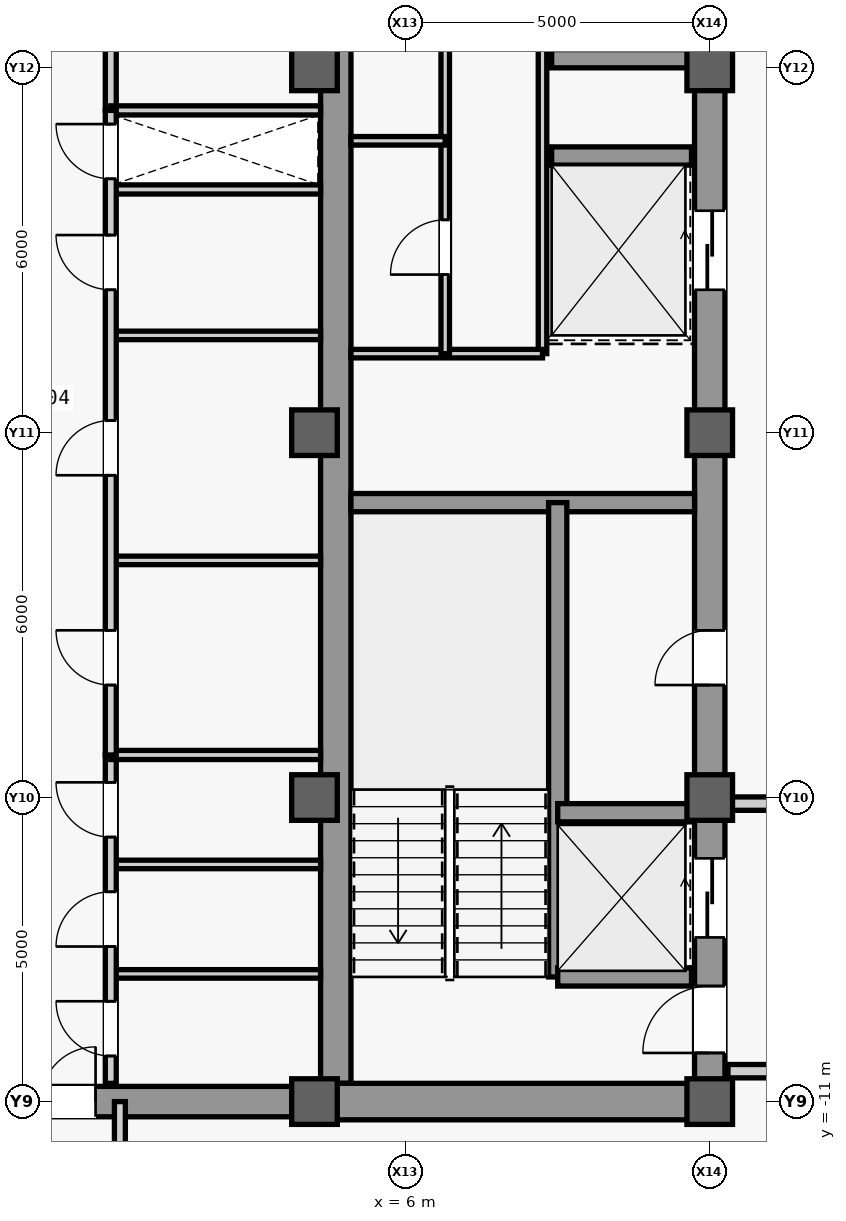
"""IFC4 building model, lengths in metres.
Left out: names, types, materials, properties, quantities, classifications, styles, units other than length and angle.
Written with IfcOpenShell. Run it as: python <this file> out.ifc"""

import sys

from ifc_helpers import new_model, si_unit, direction, frame, frame_2d, origin, origin_2d, place, context, subcontext, project, spatial, rectangle, extrude, source, transform, mapped, element, fill, save


model = new_model("IFC4")
c1 = context("Model", 3, precision=1e-05, world=origin(), true_north=direction((0.0, 1.0)))
c2 = subcontext(c1, "Body", "Model", "MODEL_VIEW")
j1 = project(units=[si_unit("LENGTHUNIT", "METRE"), si_unit("PLANEANGLEUNIT", "RADIAN")], contexts=[c1])
p1 = place(None, origin())
s1 = spatial("IfcSite", under=j1, at=p1, CompositionType="ELEMENT")
p2 = place(p1, origin())
s2 = spatial("IfcBuilding", under=s1, at=p2, CompositionType="ELEMENT")
p3 = place(p2, frame((0.0, 0.0, 313.5)))
s3 = spatial("IfcBuildingStorey", under=s2, at=p3, CompositionType="ELEMENT", Elevation=313.5)
m1 = source(origin(), c2, "Body", "SweptSolid", [
    extrude(rectangle(XDim=22.0, YDim=0.5, at=frame_2d((11.0, 0.0))), origin(), (0.0, 0.0, 1.0), 3.78),
])
p4 = place(p3, frame((11.0, -11.0, 0.0), z_axis=(0.0, 0.0, 1.0), x_axis=(0.0, 1.0, 0.0)))
e1 = element("IfcWall", 1, at=p4, inside=s3, PredefinedType="SHEAR", context=c2, shape_type="MappedRepresentation", body=[
    mapped(m1, transform((0.0, 0.0, 0.0), scale=1.0)),
])
m2 = source(origin(), c2, "Body", "SweptSolid", [
    extrude(rectangle(XDim=1.1, YDim=2.2, at=frame_2d((0.55, 1.1))), frame((0.0, 0.26, 0.0), z_axis=(0.0, -1.0, 0.0), x_axis=(1.0, 0.0, 0.0)), (0.0, 0.0, 1.0), 0.52),
])
p5 = place(p4, frame((0.8, 0.0, 0.0)))
e2 = element("IfcOpeningElement", 2, at=p5, cuts=e1, PredefinedType="OPENING", context=c2, shape_type="MappedRepresentation", body=[
    mapped(m2, transform((0.0, 0.0, 0.0), scale=1.0)),
])
m3 = source(origin(), c2, "Body", "SweptSolid", [
    extrude(rectangle(XDim=0.9, YDim=2.15, at=frame_2d((0.45, 1.075))), frame((0.0, 0.26, 0.0), z_axis=(0.0, -1.0, 0.0), x_axis=(1.0, 0.0, 0.0)), (0.0, 0.0, 1.0), 0.52),
])
p6 = place(p4, frame((6.85, 0.0, 0.0)))
e3 = element("IfcOpeningElement", 3, at=p6, cuts=e1, PredefinedType="OPENING", context=c2, shape_type="MappedRepresentation", body=[
    mapped(m3, transform((0.0, 0.0, 0.0), scale=1.0)),
])
m4 = source(origin(), c2, "Body", "SweptSolid", [
    extrude(rectangle(XDim=1.2, YDim=2.3, at=frame_2d((0.6, 1.15))), frame((0.0, 0.26, 0.0), z_axis=(0.0, -1.0, 0.0), x_axis=(1.0, 0.0, 0.0)), (0.0, 0.0, 1.0), 0.52),
])
p7 = place(p4, frame((17.6, 0.0, 0.0)))
e4 = element("IfcOpeningElement", 4, at=p7, cuts=e1, PredefinedType="OPENING", context=c2, shape_type="MappedRepresentation", body=[
    mapped(m4, transform((0.0, 0.0, 0.0), scale=1.0)),
])
p8 = place(p4, frame((19.6, 0.0, 0.0)))
e5 = element("IfcOpeningElement", 5, at=p8, cuts=e1, PredefinedType="OPENING", context=c2, shape_type="MappedRepresentation", body=[
    mapped(m4, transform((0.0, 0.0, 0.0), scale=1.0)),
])
m5 = source(origin(), c2, "Body", "SweptSolid", [
    extrude(rectangle(XDim=1.3, YDim=2.3, at=frame_2d((0.65, 1.15))), frame((0.0, 0.26, 0.0), z_axis=(0.0, -1.0, 0.0), x_axis=(1.0, 0.0, 0.0)), (0.0, 0.0, 1.0), 0.52),
])
p9 = place(p4, frame((2.7, 0.0, 0.0)))
e6 = element("IfcOpeningElement", 6, at=p9, cuts=e1, PredefinedType="OPENING", context=c2, shape_type="MappedRepresentation", body=[
    mapped(m5, transform((0.0, 0.0, 0.0), scale=1.0)),
])
p10 = place(p4, frame((13.35, 0.0, 0.0)))
e7 = element("IfcOpeningElement", 7, at=p10, cuts=e1, PredefinedType="OPENING", context=c2, shape_type="MappedRepresentation", body=[
    mapped(m5, transform((0.0, 0.0, 0.0), scale=1.0)),
])
m6 = source(origin(), c2, "Body", "SweptSolid", [
    extrude(rectangle(XDim=21.4, YDim=0.5, at=frame_2d((10.7, 0.0))), origin(), (0.0, 0.0, 1.0), 3.78),
])
p11 = place(p3, frame((4.85, -10.7, 0.0), z_axis=(0.0, 0.0, 1.0), x_axis=(0.0, 1.0, 0.0)))
e8 = element("IfcWall", 8, at=p11, inside=s3, PredefinedType="SHEAR", context=c2, shape_type="MappedRepresentation", body=[
    mapped(m6, transform((0.0, 0.0, 0.0), scale=1.0)),
])
m7 = source(origin(), c2, "Body", "SweptSolid", [
    extrude(rectangle(XDim=5.9, YDim=0.6, at=frame_2d((2.95, 0.0))), origin(), (0.0, 0.0, 1.0), 3.78),
])
p12 = place(p3, frame((4.85, -11.0, 0.0), z_axis=(0.0, 0.0, 1.0), x_axis=(1.0, 0.0, 0.0)))
e9 = element("IfcWall", 9, at=p12, inside=s3, PredefinedType="SHEAR", context=c2, shape_type="MappedRepresentation", body=[
    mapped(m7, transform((0.0, 0.0, 0.0), scale=1.0)),
])
m8 = source(origin(), c2, "Body", "SweptSolid", [
    extrude(rectangle(XDim=5.65, YDim=0.3, at=frame_2d((2.825, 0.0))), origin(), (0.0, 0.0, 1.0), 3.78),
])
p13 = place(p3, frame((5.1, -1.15, 0.0), z_axis=(0.0, 0.0, 1.0), x_axis=(1.0, 0.0, 0.0)))
e10 = element("IfcWall", 10, at=p13, inside=s3, PredefinedType="SHEAR", context=c2, shape_type="MappedRepresentation", body=[
    mapped(m8, transform((0.0, 0.0, 0.0), scale=1.0)),
])
m9 = source(origin(), c2, "Body", "SweptSolid", [
    extrude(rectangle(XDim=9.2, YDim=0.5, at=frame_2d((4.6, 0.0))), origin(), (0.0, 0.0, 1.0), 3.78),
])
p14 = place(p3, frame((-4.6, -11.0, 0.0), z_axis=(0.0, 0.0, 1.0), x_axis=(1.0, 0.0, 0.0)))
e11 = element("IfcWall", 11, at=p14, inside=s3, PredefinedType="SHEAR", context=c2, shape_type="MappedRepresentation", body=[
    mapped(m9, transform((0.0, 0.0, 0.0), scale=1.0)),
])
m10 = source(origin(), c2, "Body", "SweptSolid", [
    extrude(rectangle(XDim=1.8, YDim=2.25, at=frame_2d((0.9, 1.125))), frame((0.0, 0.26, 0.0), z_axis=(0.0, -1.0, 0.0), x_axis=(1.0, 0.0, 0.0)), (0.0, 0.0, 1.0), 0.52),
])
p15 = place(p14, frame((3.7, 0.0, 0.0)))
e12 = element("IfcOpeningElement", 12, at=p15, cuts=e11, PredefinedType="OPENING", context=c2, shape_type="MappedRepresentation", body=[
    mapped(m10, transform((0.0, 0.0, 0.0), scale=1.0)),
])
m11 = source(origin(), c2, "Body", "SweptSolid", [
    extrude(rectangle(XDim=0.75, YDim=0.75, at=origin_2d()), origin(), (0.0, 0.0, 1.0), 4.0),
])
for number, where, z_axis, x_axis in (
    (13, (4.5, -11.0, 0.0), (0.0, 0.0, 1.0), (1.0, 0.0, 0.0)),
    (14, (4.5, -6.0, 0.0), (0.0, 0.0, 1.0), (1.0, 0.0, 0.0)),
    (15, (4.5, 0.0, 0.0), (0.0, 0.0, 1.0), (1.0, 0.0, 0.0)),
    (16, (4.5, 6.0, 0.0), (0.0, 0.0, 1.0), (1.0, 0.0, 0.0)),
    (17, (11.0, -11.0, 0.0), (0.0, 0.0, 1.0), (1.0, 0.0, 0.0)),
    (18, (11.0, -6.0, 0.0), (0.0, 0.0, 1.0), (1.0, 0.0, 0.0)),
    (19, (11.0, 0.0, 0.0), (0.0, 0.0, 1.0), (1.0, 0.0, 0.0)),
    (20, (11.0, 6.0, 0.0), (0.0, 0.0, 1.0), (1.0, 0.0, 0.0)),
):
    element("IfcColumn", number, at=place(p3, frame(where, z_axis=z_axis, x_axis=x_axis)), inside=s3, PredefinedType="COLUMN", context=c2, shape_type="MappedRepresentation", body=[
        mapped(m11, transform((0.0, 0.0, 0.0), scale=1.0)),
    ])
m12 = source(origin(), c2, "Body", "SweptSolid", [
    extrude(rectangle(XDim=7.8, YDim=0.3, at=frame_2d((3.9, 0.0))), origin(), (0.0, 0.0, 1.0), 3.78),
])
p16 = place(p3, frame((8.5, -8.95, 0.0), z_axis=(0.0, 0.0, 1.0), x_axis=(0.0, 1.0, 0.0)))
e21 = element("IfcWall", 21, at=p16, inside=s3, PredefinedType="SHEAR", context=c2, shape_type="MappedRepresentation", body=[
    mapped(m12, transform((0.0, 0.0, 0.0), scale=1.0)),
])
m13 = source(origin(), c2, "Body", "SweptSolid", [
    extrude(rectangle(XDim=2.2, YDim=0.3, at=frame_2d((1.1, 0.0))), origin(), (0.0, 0.0, 1.0), 3.78),
])
for number, where, z_axis, x_axis in (
    (22, (8.5, -8.95, 0.0), (0.0, 0.0, 1.0), (1.0, 0.0, 0.0)),
    (23, (8.5, -6.25, 0.0), (0.0, 0.0, 1.0), (1.0, 0.0, 0.0)),
):
    element("IfcWall", number, at=place(p3, frame(where, z_axis=z_axis, x_axis=x_axis)), inside=s3, PredefinedType="SHEAR", context=c2, shape_type="MappedRepresentation", body=[
        mapped(m13, transform((0.0, 0.0, 0.0), scale=1.0)),
    ])
m14 = source(origin(), c2, "Body", "SweptSolid", [
    extrude(rectangle(XDim=2.3, YDim=0.3, at=frame_2d((1.15, 0.0))), origin(), (0.0, 0.0, 1.0), 3.78),
])
for number, where, z_axis, x_axis in (
    (24, (8.4, 4.55, 0.0), (0.0, 0.0, 1.0), (1.0, 0.0, 0.0)),
    (25, (8.4, 6.15, 0.0), (0.0, 0.0, 1.0), (1.0, 0.0, 0.0)),
):
    element("IfcWall", number, at=place(p3, frame(where, z_axis=z_axis, x_axis=x_axis)), inside=s3, PredefinedType="SHEAR", context=c2, shape_type="MappedRepresentation", body=[
        mapped(m14, transform((0.0, 0.0, 0.0), scale=1.0)),
    ])
m15 = source(origin(), c2, "Body", "SweptSolid", [
    extrude(rectangle(XDim=9.4, YDim=0.14, at=frame_2d((4.7, 0.0))), origin(), (0.0, 0.0, 1.0), 3.78),
])
p17 = place(p3, frame((8.25, 1.3, 0.0), z_axis=(0.0, 0.0, 1.0), x_axis=(0.0, 1.0, 0.0)))
e26 = element("IfcWall", 26, at=p17, inside=s3, PredefinedType="PARTITIONING", context=c2, shape_type="MappedRepresentation", body=[
    mapped(m15, transform((0.0, 0.0, 0.0), scale=1.0)),
])
m16 = source(origin(), c2, "Body", "SweptSolid", [
    extrude(rectangle(XDim=3.15, YDim=0.14, at=frame_2d((1.575, 0.0))), origin(), (0.0, 0.0, 1.0), 3.78),
])
p18 = place(p3, frame((5.1, 1.3, 0.0), z_axis=(0.0, 0.0, 1.0), x_axis=(1.0, 0.0, 0.0)))
e27 = element("IfcWall", 27, at=p18, inside=s3, PredefinedType="PARTITIONING", context=c2, shape_type="MappedRepresentation", body=[
    mapped(m16, transform((0.0, 0.0, 0.0), scale=1.0)),
])
m17 = source(origin(), c2, "Body", "SweptSolid", [
    extrude(rectangle(XDim=7.1, YDim=0.14, at=frame_2d((3.55, 0.0))), origin(), (0.0, 0.0, 1.0), 3.78),
])
p19 = place(p3, frame((6.65, 1.3, 0.0), z_axis=(0.0, 0.0, 1.0), x_axis=(0.0, 1.0, 0.0)))
e28 = element("IfcWall", 28, at=p19, inside=s3, PredefinedType="PARTITIONING", context=c2, shape_type="MappedRepresentation", body=[
    mapped(m17, transform((0.0, 0.0, 0.0), scale=1.0)),
])
m18 = source(origin(), c2, "Body", "SweptSolid", [
    extrude(rectangle(XDim=0.9, YDim=2.15, at=frame_2d((0.45, 1.075))), frame((0.0, 0.08, 0.0), z_axis=(0.0, -1.0, 0.0), x_axis=(1.0, 0.0, 0.0)), (0.0, 0.0, 1.0), 0.16),
])
p20 = place(p19, frame((1.3, 0.0, 0.0)))
e29 = element("IfcOpeningElement", 29, at=p20, cuts=e28, PredefinedType="OPENING", context=c2, shape_type="MappedRepresentation", body=[
    mapped(m18, transform((0.0, 0.0, 0.0), scale=1.0)),
])
m19 = source(origin(), c2, "Body", "SweptSolid", [
    extrude(rectangle(XDim=1.55, YDim=0.14, at=frame_2d((0.775, 0.0))), origin(), (0.0, 0.0, 1.0), 3.78),
])
p21 = place(p3, frame((5.1, 4.8, 0.0), z_axis=(0.0, 0.0, 1.0), x_axis=(1.0, 0.0, 0.0)))
e30 = element("IfcWall", 30, at=p21, inside=s3, PredefinedType="PARTITIONING", context=c2, shape_type="MappedRepresentation", body=[
    mapped(m19, transform((0.0, 0.0, 0.0), scale=1.0)),
])
m20 = source(origin(), c2, "Body", "SweptSolid", [
    extrude(rectangle(XDim=4.05, YDim=0.22, at=frame_2d((2.025, 0.0))), origin(), (0.0, 0.0, 1.0), 3.78),
])
p22 = place(p3, frame((11.3, -10.5, 0.0), z_axis=(0.0, 0.0, 1.0), x_axis=(1.0, 0.0, 0.0)))
e31 = element("IfcWall", 31, at=p22, inside=s3, PredefinedType="PARTITIONING", context=c2, shape_type="MappedRepresentation", body=[
    mapped(m20, transform((0.0, 0.0, 0.0), scale=1.0)),
])
m21 = source(origin(), c2, "Body", "SweptSolid", [
    extrude(rectangle(XDim=4.05, YDim=0.22, at=frame_2d((2.025, 0.0))), origin(), (0.0, 0.0, 1.0), 3.085),
])
p23 = place(p3, frame((11.3, -6.1, 0.0), z_axis=(0.0, 0.0, 1.0), x_axis=(1.0, 0.0, 0.0)))
e32 = element("IfcWall", 32, at=p23, inside=s3, PredefinedType="PARTITIONING", context=c2, shape_type="MappedRepresentation", body=[
    mapped(m21, transform((0.0, 0.0, 0.0), scale=1.0)),
])
m22 = source(origin(), c2, "Body", "SweptSolid", [
    extrude(rectangle(XDim=3.45, YDim=0.15, at=frame_2d((1.725, 0.0))), origin(), (0.0, 0.0, 1.0), 3.78),
])
p24 = place(p3, frame((1.15, 4.0, 0.0), z_axis=(0.0, 0.0, 1.0), x_axis=(1.0, 0.0, 0.0)))
e33 = element("IfcWall", 33, at=p24, inside=s3, PredefinedType="PARTITIONING", context=c2, shape_type="MappedRepresentation", body=[
    mapped(m22, transform((0.0, 0.0, 0.0), scale=1.0)),
])
m23 = source(origin(), c2, "Body", "SweptSolid", [
    extrude(rectangle(XDim=3.45, YDim=0.14, at=frame_2d((1.725, 0.0))), origin(), (0.0, 0.0, 1.0), 3.78),
])
for number, where, z_axis, x_axis in (
    (34, (1.15, -8.9, 0.0), (0.0, 0.0, 1.0), (1.0, 0.0, 0.0)),
    (35, (1.15, -7.1, 0.0), (0.0, 0.0, 1.0), (1.0, 0.0, 0.0)),
):
    element("IfcWall", number, at=place(p3, frame(where, z_axis=z_axis, x_axis=x_axis)), inside=s3, PredefinedType="PARTITIONING", context=c2, shape_type="MappedRepresentation", body=[
        mapped(m23, transform((0.0, 0.0, 0.0), scale=1.0)),
    ])
m24 = source(origin(), c2, "Body", "SweptSolid", [
    extrude(rectangle(XDim=5.4, YDim=0.18, at=frame_2d((2.7, 0.0))), origin(), (0.0, 0.0, 1.0), 3.78),
])
p25 = place(p3, frame((1.15, -10.7, 0.0), z_axis=(0.0, 0.0, 1.0), x_axis=(0.0, 1.0, 0.0)))
e36 = element("IfcWall", 36, at=p25, inside=s3, PredefinedType="PARTITIONING", context=c2, shape_type="MappedRepresentation", body=[
    mapped(m24, transform((0.0, 0.0, 0.0), scale=1.0)),
])
m25 = source(origin(), c2, "Body", "SweptSolid", [
    extrude(rectangle(XDim=0.9, YDim=2.15, at=frame_2d((0.45, 1.075))), frame((0.0, 0.1, 0.0), z_axis=(0.0, -1.0, 0.0), x_axis=(1.0, 0.0, 0.0)), (0.0, 0.0, 1.0), 0.2),
])
p26 = place(p25, frame((0.45, 0.0, 0.0)))
e37 = element("IfcOpeningElement", 37, at=p26, cuts=e36, PredefinedType="OPENING", context=c2, shape_type="MappedRepresentation", body=[
    mapped(m25, transform((0.0, 0.0, 0.0), scale=1.0)),
])
p27 = place(p25, frame((2.25, 0.0, 0.0)))
e38 = element("IfcOpeningElement", 38, at=p27, cuts=e36, PredefinedType="OPENING", context=c2, shape_type="MappedRepresentation", body=[
    mapped(m25, transform((0.0, 0.0, 0.0), scale=1.0)),
])
p28 = place(p25, frame((4.05, 0.0, 0.0)))
e39 = element("IfcOpeningElement", 39, at=p28, cuts=e36, PredefinedType="OPENING", context=c2, shape_type="MappedRepresentation", body=[
    mapped(m25, transform((0.0, 0.0, 0.0), scale=1.0)),
])
p29 = place(p3, frame((1.15, -5.3, 0.0), z_axis=(0.0, 0.0, 1.0), x_axis=(1.0, 0.0, 0.0)))
e40 = element("IfcWall", 40, at=p29, inside=s3, PredefinedType="PARTITIONING", context=c2, shape_type="MappedRepresentation", body=[
    mapped(m22, transform((0.0, 0.0, 0.0), scale=1.0)),
])
p30 = place(p3, frame((1.15, 5.3, 0.0), z_axis=(0.0, 0.0, 1.0), x_axis=(0.0, 1.0, 0.0)))
e41 = element("IfcWall", 41, at=p30, inside=s3, PredefinedType="PARTITIONING", context=c2, shape_type="MappedRepresentation", body=[
    mapped(m24, transform((0.0, 0.0, 0.0), scale=1.0)),
])
p31 = place(p30, frame((2.25, 0.0, 0.0)))
e42 = element("IfcOpeningElement", 42, at=p31, cuts=e41, PredefinedType="OPENING", context=c2, shape_type="MappedRepresentation", body=[
    mapped(m25, transform((0.0, 0.0, 0.0), scale=1.0)),
])
p32 = place(p3, frame((1.15, 5.3, 0.0), z_axis=(0.0, 0.0, 1.0), x_axis=(1.0, 0.0, 0.0)))
e43 = element("IfcWall", 43, at=p32, inside=s3, PredefinedType="PARTITIONING", context=c2, shape_type="MappedRepresentation", body=[
    mapped(m22, transform((0.0, 0.0, 0.0), scale=1.0)),
])
for number, where, z_axis, x_axis in (
    (44, (1.15, -2.1, 0.0), (0.0, 0.0, 1.0), (1.0, 0.0, 0.0)),
    (45, (1.15, 1.6, 0.0), (0.0, 0.0, 1.0), (1.0, 0.0, 0.0)),
):
    element("IfcWall", number, at=place(p3, frame(where, z_axis=z_axis, x_axis=x_axis)), inside=s3, PredefinedType="PARTITIONING", context=c2, shape_type="MappedRepresentation", body=[
        mapped(m23, transform((0.0, 0.0, 0.0), scale=1.0)),
    ])
m26 = source(origin(), c2, "Body", "SweptSolid", [
    extrude(rectangle(XDim=10.6, YDim=0.18, at=frame_2d((5.3, 0.0))), origin(), (0.0, 0.0, 1.0), 3.78),
])
p33 = place(p3, frame((1.15, -5.3, 0.0), z_axis=(0.0, 0.0, 1.0), x_axis=(0.0, 1.0, 0.0)))
e46 = element("IfcWall", 46, at=p33, inside=s3, PredefinedType="PARTITIONING", context=c2, shape_type="MappedRepresentation", body=[
    mapped(m26, transform((0.0, 0.0, 0.0), scale=1.0)),
])
p34 = place(p33, frame((1.15, 0.0, 0.0)))
e47 = element("IfcOpeningElement", 47, at=p34, cuts=e46, PredefinedType="OPENING", context=c2, shape_type="MappedRepresentation", body=[
    mapped(m25, transform((0.0, 0.0, 0.0), scale=1.0)),
])
p35 = place(p33, frame((4.6, 0.0, 0.0)))
e48 = element("IfcOpeningElement", 48, at=p35, cuts=e46, PredefinedType="OPENING", context=c2, shape_type="MappedRepresentation", body=[
    mapped(m25, transform((0.0, 0.0, 0.0), scale=1.0)),
])
p36 = place(p33, frame((7.65, 0.0, 0.0)))
e49 = element("IfcOpeningElement", 49, at=p36, cuts=e46, PredefinedType="OPENING", context=c2, shape_type="MappedRepresentation", body=[
    mapped(m25, transform((0.0, 0.0, 0.0), scale=1.0)),
])
p37 = place(p33, frame((9.475, 0.0, 0.0)))
e50 = element("IfcOpeningElement", 50, at=p37, cuts=e46, PredefinedType="OPENING", context=c2, shape_type="MappedRepresentation", body=[
    mapped(m25, transform((0.0, 0.0, 0.0), scale=1.0)),
])
m27 = source(origin(), c2, "Body", "SweptSolid", [
    extrude(rectangle(XDim=4.6, YDim=0.18, at=frame_2d((2.3, 0.0))), origin(), (0.0, 0.0, 1.0), 3.78),
])
p38 = place(p3, frame((1.3, -15.6, 0.0), z_axis=(0.0, 0.0, 1.0), x_axis=(0.0, 1.0, 0.0)))
e51 = element("IfcWall", 51, at=p38, inside=s3, PredefinedType="PARTITIONING", context=c2, shape_type="MappedRepresentation", body=[
    mapped(m27, transform((0.0, 0.0, 0.0), scale=1.0)),
])
m28 = source(origin(), c2, "Body", "SweptSolid", [
    extrude(rectangle(XDim=1.1, YDim=2.2, at=frame_2d((0.55, 1.1))), frame((0.0, 0.025, 0.0), z_axis=(0.0, -1.0, 0.0), x_axis=(1.0, 0.0, 0.0)), (0.0, 0.0, 1.0), 0.05),
])
p39 = place(p5, origin())
e52 = element("IfcDoor", 52, at=p39, inside=s3, OperationType="SINGLE_SWING_LEFT", PredefinedType="DOOR", context=c2, shape_type="MappedRepresentation", body=[
    mapped(m28, transform((0.0, 0.0, 0.0), scale=1.0)),
])
fill(e2, e52)
m29 = source(origin(), c2, "Body", "SweptSolid", [
    extrude(rectangle(XDim=0.9, YDim=2.15, at=frame_2d((0.45, 1.075))), frame((0.0, 0.025, 0.0), z_axis=(0.0, -1.0, 0.0), x_axis=(1.0, 0.0, 0.0)), (0.0, 0.0, 1.0), 0.05),
])
p40 = place(p6, origin())
e53 = element("IfcDoor", 53, at=p40, inside=s3, OperationType="SINGLE_SWING_LEFT", PredefinedType="DOOR", context=c2, shape_type="MappedRepresentation", body=[
    mapped(m29, transform((0.0, 0.0, 0.0), scale=1.0)),
])
fill(e3, e53)
p41 = place(p20, origin())
e54 = element("IfcDoor", 54, at=p41, inside=s3, OperationType="SINGLE_SWING_LEFT", PredefinedType="DOOR", context=c2, shape_type="MappedRepresentation", body=[
    mapped(m29, transform((0.0, 0.0, 0.0), scale=1.0)),
])
fill(e29, e54)
p42 = place(p26, origin())
e55 = element("IfcDoor", 55, at=p42, inside=s3, OperationType="SINGLE_SWING_RIGHT", PredefinedType="DOOR", context=c2, shape_type="MappedRepresentation", body=[
    mapped(m29, transform((0.0, 0.0, 0.0), scale=1.0)),
])
fill(e37, e55)
p43 = place(p27, origin())
e56 = element("IfcDoor", 56, at=p43, inside=s3, OperationType="SINGLE_SWING_LEFT", PredefinedType="DOOR", context=c2, shape_type="MappedRepresentation", body=[
    mapped(m29, transform((0.0, 0.0, 0.0), scale=1.0)),
])
fill(e38, e56)
p44 = place(p28, origin())
e57 = element("IfcDoor", 57, at=p44, inside=s3, OperationType="SINGLE_SWING_RIGHT", PredefinedType="DOOR", context=c2, shape_type="MappedRepresentation", body=[
    mapped(m29, transform((0.0, 0.0, 0.0), scale=1.0)),
])
fill(e39, e57)
m30 = source(origin(), c2, "Body", "SweptSolid", [
    extrude(rectangle(XDim=1.8, YDim=2.25, at=frame_2d((0.9, 1.125))), frame((0.0, 0.025, 0.0), z_axis=(0.0, -1.0, 0.0), x_axis=(1.0, 0.0, 0.0)), (0.0, 0.0, 1.0), 0.05),
])
p45 = place(p15, origin())
e58 = element("IfcDoor", 58, at=p45, inside=s3, OperationType="SINGLE_SWING_LEFT", PredefinedType="DOOR", context=c2, shape_type="MappedRepresentation", body=[
    mapped(m30, transform((0.0, 0.0, 0.0), scale=1.0)),
])
fill(e12, e58)
p46 = place(p34, origin())
e59 = element("IfcDoor", 59, at=p46, inside=s3, OperationType="SINGLE_SWING_RIGHT", PredefinedType="DOOR", context=c2, shape_type="MappedRepresentation", body=[
    mapped(m29, transform((0.0, 0.0, 0.0), scale=1.0)),
])
fill(e47, e59)
p47 = place(p35, origin())
e60 = element("IfcDoor", 60, at=p47, inside=s3, OperationType="SINGLE_SWING_LEFT", PredefinedType="DOOR", context=c2, shape_type="MappedRepresentation", body=[
    mapped(m29, transform((0.0, 0.0, 0.0), scale=1.0)),
])
fill(e48, e60)
p48 = place(p36, origin())
e61 = element("IfcDoor", 61, at=p48, inside=s3, OperationType="SINGLE_SWING_RIGHT", PredefinedType="DOOR", context=c2, shape_type="MappedRepresentation", body=[
    mapped(m29, transform((0.0, 0.0, 0.0), scale=1.0)),
])
fill(e49, e61)
p49 = place(p37, origin())
e62 = element("IfcDoor", 62, at=p49, inside=s3, OperationType="SINGLE_SWING_RIGHT", PredefinedType="DOOR", context=c2, shape_type="MappedRepresentation", body=[
    mapped(m29, transform((0.0, 0.0, 0.0), scale=1.0)),
])
fill(e50, e62)
m31 = source(origin(), c2, "Body", "SweptSolid", [
    extrude(rectangle(XDim=1.3, YDim=2.3, at=frame_2d((0.65, 1.15))), frame((0.0, 0.025, 0.0), z_axis=(0.0, -1.0, 0.0), x_axis=(1.0, 0.0, 0.0)), (0.0, 0.0, 1.0), 0.05),
])
p50 = place(p9, origin())
e63 = element("IfcDoor", 63, at=p50, inside=s3, OperationType="SLIDING_TO_LEFT", PredefinedType="DOOR", context=c2, shape_type="MappedRepresentation", body=[
    mapped(m31, transform((0.0, 0.0, 0.0), scale=1.0)),
])
fill(e6, e63)
p51 = place(p10, origin())
e64 = element("IfcDoor", 64, at=p51, inside=s3, OperationType="SLIDING_TO_LEFT", PredefinedType="DOOR", context=c2, shape_type="MappedRepresentation", body=[
    mapped(m31, transform((0.0, 0.0, 0.0), scale=1.0)),
])
fill(e7, e64)
save(model, sys.argv[1])
